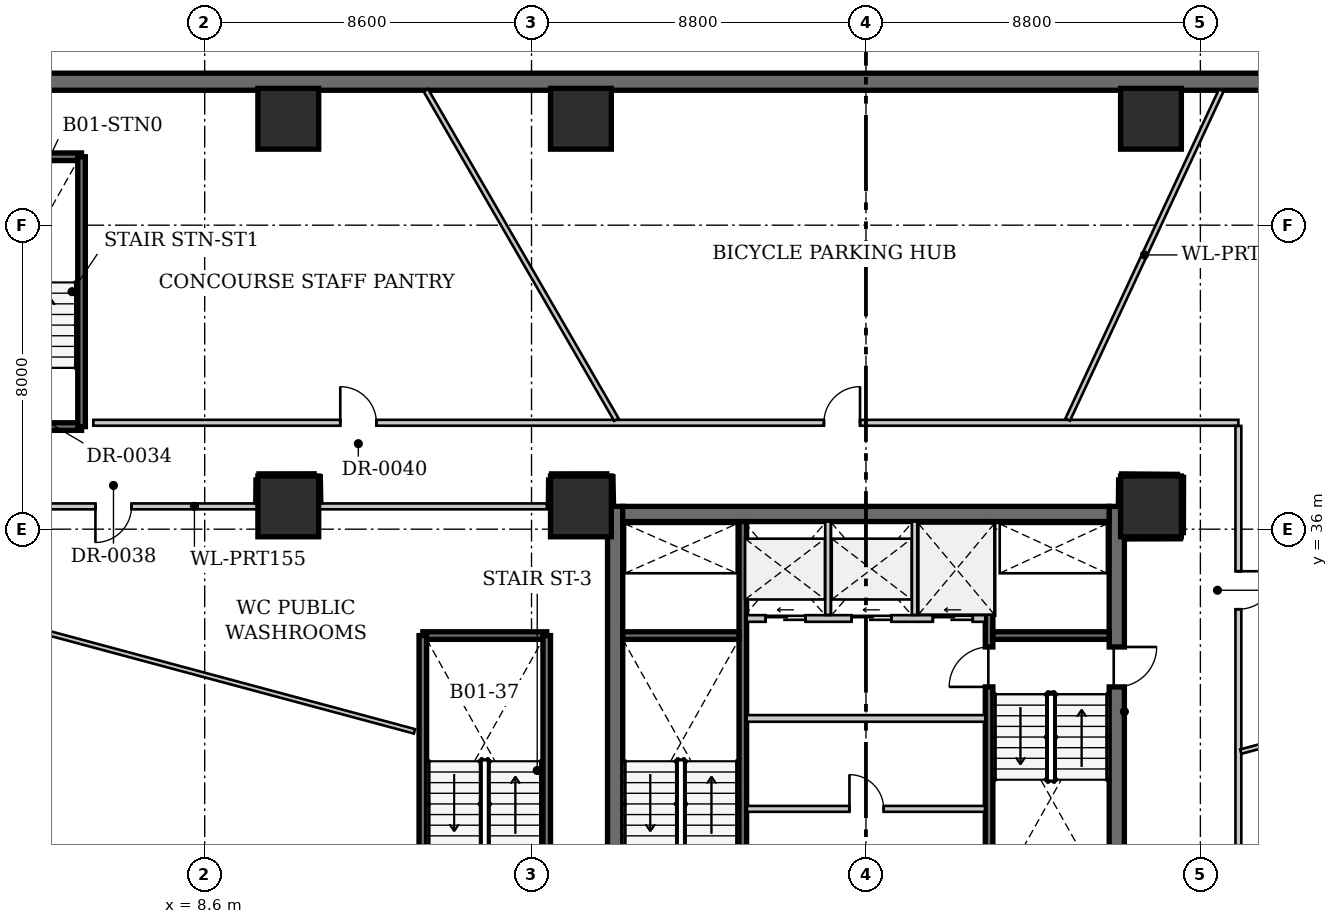
"""IFC4 building model, lengths in metres.
Left out: names, types, materials, properties, quantities, classifications, styles, units other than length and angle.
Written with IfcOpenShell. Run it as: python <this file> out.ifc"""

import sys

from ifc_helpers import new_model, si_unit, direction, frame, frame_2d, origin, origin_2d, place, context, subcontext, project, spatial, rectangle, extrude, source, transform, mapped, element, fill, save


model = new_model("IFC4")
c1 = context("Model", 3, precision=1e-05, world=origin(), true_north=direction((0.0, 1.0)))
c2 = subcontext(c1, "Body", "Model", "MODEL_VIEW")
j1 = project(units=[si_unit("LENGTHUNIT", "METRE"), si_unit("PLANEANGLEUNIT", "RADIAN")], contexts=[c1])
p1 = place(None, origin())
s1 = spatial("IfcSite", under=j1, at=p1, CompositionType="ELEMENT")
p2 = place(p1, origin())
s2 = spatial("IfcBuilding", under=s1, at=p2, CompositionType="ELEMENT")
p3 = place(p2, frame((0.0, 0.0, -5.8)))
s3 = spatial("IfcBuildingStorey", under=s2, at=p3, CompositionType="ELEMENT", Elevation=-5.8)
for number, where, z_axis, x_axis in (
    (1, (10.8, 46.8, 0.0), (0.0, 0.0, 1.0), (1.0, 0.0, 0.0)),
    (2, (18.5, 46.8, 0.0), (0.0, 0.0, 1.0), (1.0, 0.0, 0.0)),
    (3, (33.5, 46.8, 0.0), (0.0, 0.0, 1.0), (1.0, 0.0, 0.0)),
    (4, (10.8, 36.6, 0.0), (0.0, 0.0, 1.0), (1.0, 0.0, 0.0)),
    (5, (18.5, 36.6, 0.0), (0.0, 0.0, 1.0), (1.0, 0.0, 0.0)),
    (6, (33.5, 36.6, 0.0), (0.0, 0.0, 1.0), (1.0, 0.0, 0.0)),
):
    element("IfcColumn", number, at=place(p3, frame(where, z_axis=z_axis, x_axis=x_axis)), inside=s3, PredefinedType="COLUMN", context=c2, shape_type="SweptSolid", body=[
        extrude(rectangle(XDim=1.6, YDim=1.6, at=origin_2d()), origin(), (0.0, 0.0, 1.0), 5.45),
    ])
p4 = place(p3, frame((0.225, 47.775, 0.0), z_axis=(0.0, 0.0, 1.0), x_axis=(1.0, 0.0, 0.0)))
e7 = element("IfcWall", 7, at=p4, inside=s3, PredefinedType="SHEAR", context=c2, shape_type="SweptSolid", body=[
    extrude(rectangle(XDim=51.55, YDim=0.45, at=frame_2d((25.775, 0.0))), origin(), (0.0, 0.0, 1.0), 5.8),
])
p5 = place(p3, frame((19.4, 25.8, 0.0), z_axis=(0.0, 0.0, 1.0), x_axis=(0.0, 1.0, 0.0)))
e8 = element("IfcWall", 8, at=p5, inside=s3, PredefinedType="SHEAR", context=c2, shape_type="SweptSolid", body=[
    extrude(rectangle(XDim=10.8, YDim=0.4, at=frame_2d((5.4, 0.0))), origin(), (0.0, 0.0, 1.0), 5.8),
])
p6 = place(p3, frame((32.6, 36.6, 0.0), z_axis=(0.0, 0.0, 1.0), x_axis=(0.0, -1.0, 0.0)))
e9 = element("IfcWall", 9, at=p6, inside=s3, PredefinedType="SHEAR", context=c2, shape_type="SweptSolid", body=[
    extrude(rectangle(XDim=10.8, YDim=0.4, at=frame_2d((5.4, 0.0))), origin(), (0.0, 0.0, 1.0), 5.8),
])
p7 = place(p6, frame((3.7, 0.0, 0.0)))
e10 = element("IfcOpeningElement", 10, at=p7, cuts=e9, PredefinedType="OPENING", context=c2, shape_type="SweptSolid", body=[
    extrude(rectangle(XDim=1.05, YDim=2.15, at=frame_2d((0.525, 1.075))), frame((0.0, 0.21, 0.0), z_axis=(0.0, -1.0, 0.0), x_axis=(1.0, 0.0, 0.0)), (0.0, 0.0, 1.0), 0.42),
])
p8 = place(p3, frame((19.6, 36.4, 0.0), z_axis=(0.0, 0.0, 1.0), x_axis=(1.0, 0.0, 0.0)))
e11 = element("IfcWall", 11, at=p8, inside=s3, PredefinedType="SHEAR", context=c2, shape_type="SweptSolid", body=[
    extrude(rectangle(XDim=12.8, YDim=0.4, at=frame_2d((6.4, 0.0))), origin(), (0.0, 0.0, 1.0), 5.8),
])
p9 = place(p3, frame((22.76, 26.2, 0.0), z_axis=(0.0, 0.0, 1.0), x_axis=(0.0, 1.0, 0.0)))
e12 = element("IfcWall", 12, at=p9, inside=s3, PredefinedType="SHEAR", context=c2, shape_type="SweptSolid", body=[
    extrude(rectangle(XDim=10.0, YDim=0.2, at=frame_2d((5.0, 0.0))), origin(), (0.0, 0.0, 1.0), 5.8),
])
p10 = place(p3, frame((29.24, 26.2, 0.0), z_axis=(0.0, 0.0, 1.0), x_axis=(0.0, 1.0, 0.0)))
e13 = element("IfcWall", 13, at=p10, inside=s3, PredefinedType="SHEAR", context=c2, shape_type="SweptSolid", body=[
    extrude(rectangle(XDim=10.0, YDim=0.2, at=frame_2d((5.0, 0.0))), origin(), (0.0, 0.0, 1.0), 5.8),
])
p11 = place(p10, frame((5.65, 0.0, 0.0)))
e14 = element("IfcOpeningElement", 14, at=p11, cuts=e13, PredefinedType="OPENING", context=c2, shape_type="SweptSolid", body=[
    extrude(rectangle(XDim=1.05, YDim=2.15, at=frame_2d((0.525, 1.075))), frame((0.0, 0.11, 0.0), z_axis=(0.0, -1.0, 0.0), x_axis=(1.0, 0.0, 0.0)), (0.0, 0.0, 1.0), 0.22),
])
for number, where, z_axis, x_axis in (
    (15, (19.6, 33.2, 0.0), (0.0, 0.0, 1.0), (1.0, 0.0, 0.0)),
    (16, (29.34, 33.2, 0.0), (0.0, 0.0, 1.0), (1.0, 0.0, 0.0)),
):
    element("IfcWall", number, at=place(p3, frame(where, z_axis=z_axis, x_axis=x_axis)), inside=s3, PredefinedType="SHEAR", context=c2, shape_type="SweptSolid", body=[
        extrude(rectangle(XDim=3.06, YDim=0.2, at=frame_2d((1.53, 0.0))), origin(), (0.0, 0.0, 1.0), 5.8),
    ])
p12 = place(p3, frame((22.86, 33.65, 0.0), z_axis=(0.0, 0.0, 1.0), x_axis=(1.0, 0.0, 0.0)))
e17 = element("IfcWall", 17, at=p12, inside=s3, PredefinedType="SOLIDWALL", context=c2, shape_type="SweptSolid", body=[
    extrude(rectangle(XDim=6.28, YDim=0.175, at=frame_2d((3.14, 0.0))), origin(), (0.0, 0.0, 1.0), 5.45),
])
p13 = place(p12, frame((0.5, 0.0, 0.0)))
e18 = element("IfcOpeningElement", 18, at=p13, cuts=e17, PredefinedType="OPENING", context=c2, shape_type="SweptSolid", body=[
    extrude(rectangle(XDim=1.05, YDim=2.15, at=frame_2d((0.525, 1.075))), frame((0.0, 0.098, 0.0), z_axis=(0.0, -1.0, 0.0), x_axis=(1.0, 0.0, 0.0)), (0.0, 0.0, 1.0), 0.195),
])
p14 = place(p12, frame((2.76, 0.0, 0.0)))
e19 = element("IfcOpeningElement", 19, at=p14, cuts=e17, PredefinedType="OPENING", context=c2, shape_type="SweptSolid", body=[
    extrude(rectangle(XDim=1.05, YDim=2.15, at=frame_2d((0.525, 1.075))), frame((0.0, 0.098, 0.0), z_axis=(0.0, -1.0, 0.0), x_axis=(1.0, 0.0, 0.0)), (0.0, 0.0, 1.0), 0.195),
])
p15 = place(p12, frame((4.9, 0.0, 0.0)))
e20 = element("IfcOpeningElement", 20, at=p15, cuts=e17, PredefinedType="OPENING", context=c2, shape_type="SweptSolid", body=[
    extrude(rectangle(XDim=1.05, YDim=2.15, at=frame_2d((0.525, 1.075))), frame((0.0, 0.098, 0.0), z_axis=(0.0, -1.0, 0.0), x_axis=(1.0, 0.0, 0.0)), (0.0, 0.0, 1.0), 0.195),
])
for number, where, z_axis, x_axis in (
    (21, (25.0, 33.743, 0.0), (0.0, 0.0, 1.0), (0.0, 1.0, 0.0)),
    (22, (27.28, 33.743, 0.0), (0.0, 0.0, 1.0), (0.0, 1.0, 0.0)),
):
    element("IfcWall", number, at=place(p3, frame(where, z_axis=z_axis, x_axis=x_axis)), inside=s3, PredefinedType="SOLIDWALL", context=c2, shape_type="SweptSolid", body=[
        extrude(rectangle(XDim=2.457, YDim=0.145, at=frame_2d((1.228, 0.0))), origin(), (0.0, 0.0, 1.0), 5.45),
    ])
p16 = place(p3, frame((22.86, 31.02, 0.0), z_axis=(0.0, 0.0, 1.0), x_axis=(1.0, 0.0, 0.0)))
e23 = element("IfcWall", 23, at=p16, inside=s3, PredefinedType="SOLIDWALL", context=c2, shape_type="SweptSolid", body=[
    extrude(rectangle(XDim=6.28, YDim=0.175, at=frame_2d((3.14, 0.0))), origin(), (0.0, 0.0, 1.0), 5.45),
])
p17 = place(p3, frame((22.866, 28.64, 0.0), z_axis=(0.0, 0.0, 1.0), x_axis=(1.0, 0.0, 0.0)))
e24 = element("IfcWall", 24, at=p17, inside=s3, PredefinedType="PARTITIONING", context=c2, shape_type="SweptSolid", body=[
    extrude(rectangle(XDim=6.268, YDim=0.155, at=frame_2d((3.134, 0.0))), origin(), (0.0, 0.0, 1.0), 5.45),
])
p18 = place(p17, frame((2.7, 0.0, 0.0)))
e25 = element("IfcOpeningElement", 25, at=p18, cuts=e24, PredefinedType="OPENING", context=c2, shape_type="SweptSolid", body=[
    extrude(rectangle(XDim=0.9, YDim=2.1, at=frame_2d((0.45, 1.05))), frame((0.0, 0.087, 0.0), z_axis=(0.0, -1.0, 0.0), x_axis=(1.0, 0.0, 0.0)), (0.0, 0.0, 1.0), 0.175),
])
p19 = place(p3, frame((14.34, 33.2, 0.0), z_axis=(0.0, 0.0, 1.0), x_axis=(1.0, 0.0, 0.0)))
e26 = element("IfcWall", 26, at=p19, inside=s3, PredefinedType="SHEAR", context=c2, shape_type="SweptSolid", body=[
    extrude(rectangle(XDim=3.26, YDim=0.2, at=frame_2d((1.63, 0.0))), origin(), (0.0, 0.0, 1.0), 5.8),
])
for number, where, z_axis, x_axis in (
    (27, (14.34, 26.1, 0.0), (0.0, 0.0, 1.0), (0.0, 1.0, 0.0)),
    (28, (17.6, 26.1, 0.0), (0.0, 0.0, 1.0), (0.0, 1.0, 0.0)),
):
    element("IfcWall", number, at=place(p3, frame(where, z_axis=z_axis, x_axis=x_axis)), inside=s3, PredefinedType="SHEAR", context=c2, shape_type="SweptSolid", body=[
        extrude(rectangle(XDim=7.1, YDim=0.2, at=frame_2d((3.55, 0.0))), origin(), (0.0, 0.0, 1.0), 5.8),
    ])
p20 = place(p3, frame((5.36, 38.7, 0.0), z_axis=(0.0, 0.0, 1.0), x_axis=(-1.0, 0.0, 0.0)))
e29 = element("IfcWall", 29, at=p20, inside=s3, PredefinedType="SHEAR", context=c2, shape_type="SweptSolid", body=[
    extrude(rectangle(XDim=3.26, YDim=0.2, at=frame_2d((1.63, 0.0))), origin(), (0.0, 0.0, 1.0), 5.8),
])
p21 = place(p20, frame((1.1, 0.0, 0.0)))
e30 = element("IfcOpeningElement", 30, at=p21, cuts=e29, PredefinedType="OPENING", context=c2, shape_type="SweptSolid", body=[
    extrude(rectangle(XDim=1.05, YDim=2.15, at=frame_2d((0.525, 1.075))), frame((0.0, 0.11, 0.0), z_axis=(0.0, -1.0, 0.0), x_axis=(1.0, 0.0, 0.0)), (0.0, 0.0, 1.0), 0.22),
])
p22 = place(p3, frame((2.1, 45.8, 0.0), z_axis=(0.0, 0.0, 1.0), x_axis=(1.0, 0.0, 0.0)))
e31 = element("IfcWall", 31, at=p22, inside=s3, PredefinedType="SHEAR", context=c2, shape_type="SweptSolid", body=[
    extrude(rectangle(XDim=3.26, YDim=0.2, at=frame_2d((1.63, 0.0))), origin(), (0.0, 0.0, 1.0), 5.8),
])
p23 = place(p3, frame((5.36, 38.7, 0.0), z_axis=(0.0, 0.0, 1.0), x_axis=(0.0, 1.0, 0.0)))
e32 = element("IfcWall", 32, at=p23, inside=s3, PredefinedType="SHEAR", context=c2, shape_type="SweptSolid", body=[
    extrude(rectangle(XDim=7.1, YDim=0.2, at=frame_2d((3.55, 0.0))), origin(), (0.0, 0.0, 1.0), 5.8),
])
p24 = place(p3, frame((9.985, 36.6, 0.0), z_axis=(0.0, 0.0, 1.0), x_axis=(-1.0, 0.0, 0.0)))
e33 = element("IfcWall", 33, at=p24, inside=s3, PredefinedType="PARTITIONING", context=c2, shape_type="SweptSolid", body=[
    extrude(rectangle(XDim=7.57, YDim=0.155, at=frame_2d((3.785, 0.0))), origin(), (0.0, 0.0, 1.0), 4.225),
])
p25 = place(p24, frame((3.31, 0.0, 0.0)))
e34 = element("IfcOpeningElement", 34, at=p25, cuts=e33, PredefinedType="OPENING", context=c2, shape_type="SweptSolid", body=[
    extrude(rectangle(XDim=0.95, YDim=2.15, at=frame_2d((0.475, 1.075))), frame((0.0, 0.087, 0.0), z_axis=(0.0, -1.0, 0.0), x_axis=(1.0, 0.0, 0.0)), (0.0, 0.0, 1.0), 0.175),
])
p26 = place(p3, frame((5.67, 38.8, 0.0), z_axis=(0.0, 0.0, 1.0), x_axis=(1.0, 0.0, 0.0)))
e35 = element("IfcWall", 35, at=p26, inside=s3, PredefinedType="PARTITIONING", context=c2, shape_type="SweptSolid", body=[
    extrude(rectangle(XDim=30.13, YDim=0.155, at=frame_2d((15.065, 0.0))), origin(), (0.0, 0.0, 1.0), 5.45),
])
p27 = place(p26, frame((19.224, 0.0, 0.0)))
e36 = element("IfcOpeningElement", 36, at=p27, cuts=e35, PredefinedType="OPENING", context=c2, shape_type="SweptSolid", body=[
    extrude(rectangle(XDim=0.95, YDim=2.15, at=frame_2d((0.475, 1.075))), frame((0.0, 0.087, 0.0), z_axis=(0.0, -1.0, 0.0), x_axis=(1.0, 0.0, 0.0)), (0.0, 0.0, 1.0), 0.175),
])
p28 = place(p26, frame((6.498, 0.0, 0.0)))
e37 = element("IfcOpeningElement", 37, at=p28, cuts=e35, PredefinedType="OPENING", context=c2, shape_type="SweptSolid", body=[
    extrude(rectangle(XDim=0.95, YDim=2.15, at=frame_2d((0.475, 1.075))), frame((0.0, 0.087, 0.0), z_axis=(0.0, -1.0, 0.0), x_axis=(1.0, 0.0, 0.0)), (0.0, 0.0, 1.0), 0.175),
])
p29 = place(p3, frame((35.8, 38.717, 0.0), z_axis=(0.0, 0.0, 1.0), x_axis=(0.0, -1.0, 0.0)))
e38 = element("IfcWall", 38, at=p29, inside=s3, PredefinedType="PARTITIONING", context=c2, shape_type="SweptSolid", body=[
    extrude(rectangle(XDim=12.917, YDim=0.155, at=frame_2d((6.458, 0.0))), origin(), (0.0, 0.0, 1.0), 5.45),
])
p30 = place(p29, frame((3.823, 0.0, 0.0)))
e39 = element("IfcOpeningElement", 39, at=p30, cuts=e38, PredefinedType="OPENING", context=c2, shape_type="SweptSolid", body=[
    extrude(rectangle(XDim=1.0, YDim=2.15, at=frame_2d((0.5, 1.075))), frame((0.0, 0.087, 0.0), z_axis=(0.0, -1.0, 0.0), x_axis=(1.0, 0.0, 0.0)), (0.0, 0.0, 1.0), 0.175),
])
p31 = place(p3, frame((32.87, 35.785, 0.0), z_axis=(0.0, 0.0, 1.0), x_axis=(0.99999584892, 0.002881343971, 0.0)))
e40 = element("IfcWall", 40, at=p31, inside=s3, PredefinedType="PARTITIONING", context=c2, shape_type="SweptSolid", body=[
    extrude(rectangle(XDim=1.44, YDim=0.155, at=frame_2d((0.72, 0.0))), origin(), (0.0, 0.0, 1.0), 5.45),
])
p32 = place(p3, frame((34.311, 35.873, 0.0), z_axis=(0.0, 0.0, 1.0), x_axis=(0.002717815702, 0.999996306732, 0.0)))
e41 = element("IfcWall", 41, at=p32, inside=s3, PredefinedType="PARTITIONING", context=c2, shape_type="SweptSolid", body=[
    extrude(rectangle(XDim=1.527, YDim=0.155, at=frame_2d((0.764, 0.0))), origin(), (0.0, 0.0, 1.0), 5.45),
])
p33 = place(p3, frame((34.231, 37.401, 0.0), z_axis=(0.0, 0.0, 1.0), x_axis=(-0.999967255963, 0.008092404007, 0.0)))
e42 = element("IfcWall", 42, at=p33, inside=s3, PredefinedType="PARTITIONING", context=c2, shape_type="SweptSolid", body=[
    extrude(rectangle(XDim=1.539, YDim=0.155, at=frame_2d((0.769, 0.0))), origin(), (0.0, 0.0, 1.0), 5.45),
])
p34 = place(p3, frame((32.692, 37.33, 0.0), z_axis=(0.0, 0.0, 1.0), x_axis=(-0.010362137944, -0.999946311607, 0.0)))
e43 = element("IfcWall", 43, at=p34, inside=s3, PredefinedType="PARTITIONING", context=c2, shape_type="SweptSolid", body=[
    extrude(rectangle(XDim=0.66, YDim=0.155, at=frame_2d((0.33, 0.0))), origin(), (0.0, 0.0, 1.0), 5.45),
])
p35 = place(p3, frame((19.315, 36.67, 0.0), z_axis=(0.0, 0.0, 1.0), x_axis=(-0.019982902894, 0.99980032186, 0.0)))
e44 = element("IfcWall", 44, at=p35, inside=s3, PredefinedType="PARTITIONING", context=c2, shape_type="SweptSolid", body=[
    extrude(rectangle(XDim=0.745, YDim=0.155, at=frame_2d((0.373, 0.0))), origin(), (0.0, 0.0, 1.0), 5.45),
])
p36 = place(p3, frame((19.217, 37.415, 0.0), z_axis=(0.0, 0.0, 1.0), x_axis=(-0.99999937099, -0.00112161442, 0.0)))
e45 = element("IfcWall", 45, at=p36, inside=s3, PredefinedType="PARTITIONING", context=c2, shape_type="SweptSolid", body=[
    extrude(rectangle(XDim=1.524, YDim=0.155, at=frame_2d((0.762, 0.0))), origin(), (0.0, 0.0, 1.0), 5.45),
])
p37 = place(p3, frame((17.692, 37.33, 0.0), z_axis=(0.0, 0.0, 1.0), x_axis=(-0.009705031542, -0.999952905072, 0.0)))
e46 = element("IfcWall", 46, at=p37, inside=s3, PredefinedType="PARTITIONING", context=c2, shape_type="SweptSolid", body=[
    extrude(rectangle(XDim=0.729, YDim=0.155, at=frame_2d((0.365, 0.0))), origin(), (0.0, 0.0, 1.0), 5.45),
])
p38 = place(p3, frame((17.602, 36.6, 0.0), z_axis=(0.0, 0.0, 1.0), x_axis=(-1.0, 0.0, 0.0)))
e47 = element("IfcWall", 47, at=p38, inside=s3, PredefinedType="PARTITIONING", context=c2, shape_type="SweptSolid", body=[
    extrude(rectangle(XDim=5.987, YDim=0.155, at=frame_2d((2.993, 0.0))), origin(), (0.0, 0.0, 1.0), 4.225),
])
p39 = place(p3, frame((11.614, 36.684, 0.0), z_axis=(0.0, 0.0, 1.0), x_axis=(-0.01835471782, 0.999831537977, 0.0)))
e48 = element("IfcWall", 48, at=p39, inside=s3, PredefinedType="PARTITIONING", context=c2, shape_type="SweptSolid", body=[
    extrude(rectangle(XDim=0.732, YDim=0.155, at=frame_2d((0.366, 0.0))), origin(), (0.0, 0.0, 1.0), 5.45),
])
p40 = place(p3, frame((11.517, 37.415, 0.0), z_axis=(0.0, 0.0, 1.0), x_axis=(-0.99999937099, -0.00112161442, 0.0)))
e49 = element("IfcWall", 49, at=p40, inside=s3, PredefinedType="PARTITIONING", context=c2, shape_type="SweptSolid", body=[
    extrude(rectangle(XDim=1.524, YDim=0.155, at=frame_2d((0.762, 0.0))), origin(), (0.0, 0.0, 1.0), 5.45),
])
p41 = place(p3, frame((9.992, 37.33, 0.0), z_axis=(0.0, 0.0, 1.0), x_axis=(-0.009825678344, -0.999951726857, 0.0)))
e50 = element("IfcWall", 50, at=p41, inside=s3, PredefinedType="PARTITIONING", context=c2, shape_type="SweptSolid", body=[
    extrude(rectangle(XDim=0.646, YDim=0.155, at=frame_2d((0.323, 0.0))), origin(), (0.0, 0.0, 1.0), 5.45),
])
p42 = place(p3, frame((0.45, 34.35, 0.0), z_axis=(0.0, 0.0, 1.0), x_axis=(0.965797547466, -0.259297314505, 0.0)))
e51 = element("IfcWall", 51, at=p42, inside=s3, PredefinedType="PARTITIONING", context=c2, shape_type="SweptSolid", body=[
    extrude(rectangle(XDim=14.154, YDim=0.12, at=frame_2d((7.077, 0.0))), origin(), (0.0, 0.0, 1.0), 5.012),
])
p43 = place(p3, frame((35.863, 30.147, 0.0), z_axis=(0.0, 0.0, 1.0), x_axis=(0.965926109503, 0.25881798813, 0.0)))
e52 = element("IfcWall", 52, at=p43, inside=s3, PredefinedType="PARTITIONING", context=c2, shape_type="SweptSolid", body=[
    extrude(rectangle(XDim=16.241, YDim=0.12, at=frame_2d((8.12, 0.0))), origin(), (0.0, 0.0, 1.0), 5.012),
])
p44 = place(p3, frame((31.309, 38.884, 0.0), z_axis=(0.0, 0.0, 1.0), x_axis=(0.422597515668, 0.9063174608, 0.0)))
e53 = element("IfcWall", 53, at=p44, inside=s3, PredefinedType="PARTITIONING", context=c2, shape_type="SweptSolid", body=[
    extrude(rectangle(XDim=9.562, YDim=0.135, at=frame_2d((4.781, 0.0))), origin(), (0.0, 0.0, 1.0), 5.45),
])
p45 = place(p3, frame((19.432, 38.884, 0.0), z_axis=(0.0, 0.0, 1.0), x_axis=(-0.500625745696, 0.865663827791, 0.0)))
e54 = element("IfcWall", 54, at=p45, inside=s3, PredefinedType="PARTITIONING", context=c2, shape_type="SweptSolid", body=[
    extrude(rectangle(XDim=10.011, YDim=0.135, at=frame_2d((5.006, 0.0))), origin(), (0.0, 0.0, 1.0), 5.45),
])
m1 = source(origin(), c2, "Body", "SweptSolid", [
    extrude(rectangle(XDim=1.05, YDim=2.15, at=frame_2d((0.525, 1.075))), frame((0.0, 0.025, 0.0), z_axis=(0.0, -1.0, 0.0), x_axis=(1.0, 0.0, 0.0)), (0.0, 0.0, 1.0), 0.05),
])
p46 = place(p7, origin())
e55 = element("IfcDoor", 55, at=p46, inside=s3, OperationType="SINGLE_SWING_LEFT", PredefinedType="DOOR", context=c2, shape_type="MappedRepresentation", body=[
    mapped(m1, transform((0.0, 0.0, 0.0), x_axis=(1.0, 0.0, 0.0), y_axis=(0.0, 1.0, 0.0), z_axis=(0.0, 0.0, 1.0), scale=1.0)),
])
fill(e10, e55)
p47 = place(p11, origin())
e56 = element("IfcDoor", 56, at=p47, inside=s3, OperationType="SINGLE_SWING_LEFT", PredefinedType="DOOR", context=c2, shape_type="MappedRepresentation", body=[
    mapped(m1, transform((0.0, 0.0, 0.0), x_axis=(1.0, 0.0, 0.0), y_axis=(0.0, 1.0, 0.0), z_axis=(0.0, 0.0, 1.0), scale=1.0)),
])
fill(e14, e56)
m2 = source(origin(), c2, "Body", "SweptSolid", [
    extrude(rectangle(XDim=1.05, YDim=2.15, at=frame_2d((0.525, 1.075))), frame((0.0, 0.025, 0.0), z_axis=(0.0, -1.0, 0.0), x_axis=(1.0, 0.0, 0.0)), (0.0, 0.0, 1.0), 0.05),
])
p48 = place(p13, origin())
e57 = element("IfcDoor", 57, at=p48, inside=s3, OperationType="SLIDING_TO_LEFT", PredefinedType="DOOR", context=c2, shape_type="MappedRepresentation", body=[
    mapped(m2, transform((0.0, 0.0, 0.0), x_axis=(1.0, 0.0, 0.0), y_axis=(0.0, 1.0, 0.0), z_axis=(0.0, 0.0, 1.0), scale=1.0)),
])
fill(e18, e57)
p49 = place(p14, origin())
e58 = element("IfcDoor", 58, at=p49, inside=s3, OperationType="SLIDING_TO_LEFT", PredefinedType="DOOR", context=c2, shape_type="MappedRepresentation", body=[
    mapped(m2, transform((0.0, 0.0, 0.0), x_axis=(1.0, 0.0, 0.0), y_axis=(0.0, 1.0, 0.0), z_axis=(0.0, 0.0, 1.0), scale=1.0)),
])
fill(e19, e58)
p50 = place(p15, origin())
e59 = element("IfcDoor", 59, at=p50, inside=s3, OperationType="SLIDING_TO_LEFT", PredefinedType="DOOR", context=c2, shape_type="MappedRepresentation", body=[
    mapped(m2, transform((0.0, 0.0, 0.0), x_axis=(1.0, 0.0, 0.0), y_axis=(0.0, 1.0, 0.0), z_axis=(0.0, 0.0, 1.0), scale=1.0)),
])
fill(e20, e59)
m3 = source(origin(), c2, "Body", "SweptSolid", [
    extrude(rectangle(XDim=0.9, YDim=2.1, at=frame_2d((0.45, 1.05))), frame((0.0, 0.025, 0.0), z_axis=(0.0, -1.0, 0.0), x_axis=(1.0, 0.0, 0.0)), (0.0, 0.0, 1.0), 0.05),
])
p51 = place(p18, origin())
e60 = element("IfcDoor", 60, at=p51, inside=s3, OperationType="SINGLE_SWING_LEFT", PredefinedType="DOOR", context=c2, shape_type="MappedRepresentation", body=[
    mapped(m3, transform((0.0, 0.0, 0.0), x_axis=(1.0, 0.0, 0.0), y_axis=(0.0, 1.0, 0.0), z_axis=(0.0, 0.0, 1.0), scale=1.0)),
])
fill(e25, e60)
m4 = source(origin(), c2, "Body", "SweptSolid", [
    extrude(rectangle(XDim=0.95, YDim=2.15, at=frame_2d((0.475, 1.075))), frame((0.0, 0.025, 0.0), z_axis=(0.0, -1.0, 0.0), x_axis=(1.0, 0.0, 0.0)), (0.0, 0.0, 1.0), 0.05),
])
p52 = place(p25, origin())
e61 = element("IfcDoor", 61, at=p52, inside=s3, OperationType="SINGLE_SWING_RIGHT", PredefinedType="DOOR", context=c2, shape_type="MappedRepresentation", body=[
    mapped(m4, transform((0.0, 0.0, 0.0), x_axis=(1.0, 0.0, 0.0), y_axis=(0.0, 1.0, 0.0), z_axis=(0.0, 0.0, 1.0), scale=1.0)),
])
fill(e34, e61)
p53 = place(p27, origin())
e62 = element("IfcDoor", 62, at=p53, inside=s3, OperationType="SINGLE_SWING_RIGHT", PredefinedType="DOOR", context=c2, shape_type="MappedRepresentation", body=[
    mapped(m4, transform((0.0, 0.0, 0.0), x_axis=(1.0, 0.0, 0.0), y_axis=(0.0, 1.0, 0.0), z_axis=(0.0, 0.0, 1.0), scale=1.0)),
])
fill(e36, e62)
p54 = place(p28, origin())
e63 = element("IfcDoor", 63, at=p54, inside=s3, OperationType="SINGLE_SWING_LEFT", PredefinedType="DOOR", context=c2, shape_type="MappedRepresentation", body=[
    mapped(m4, transform((0.0, 0.0, 0.0), x_axis=(1.0, 0.0, 0.0), y_axis=(0.0, 1.0, 0.0), z_axis=(0.0, 0.0, 1.0), scale=1.0)),
])
fill(e37, e63)
m5 = source(origin(), c2, "Body", "SweptSolid", [
    extrude(rectangle(XDim=1.0, YDim=2.15, at=frame_2d((0.5, 1.075))), frame((0.0, 0.025, 0.0), z_axis=(0.0, -1.0, 0.0), x_axis=(1.0, 0.0, 0.0)), (0.0, 0.0, 1.0), 0.05),
])
p55 = place(p30, origin())
e64 = element("IfcDoor", 64, at=p55, inside=s3, OperationType="SINGLE_SWING_LEFT", PredefinedType="DOOR", context=c2, shape_type="MappedRepresentation", body=[
    mapped(m5, transform((0.0, 0.0, 0.0), x_axis=(1.0, 0.0, 0.0), y_axis=(0.0, 1.0, 0.0), z_axis=(0.0, 0.0, 1.0), scale=1.0)),
])
fill(e39, e64)
save(model, sys.argv[1])
